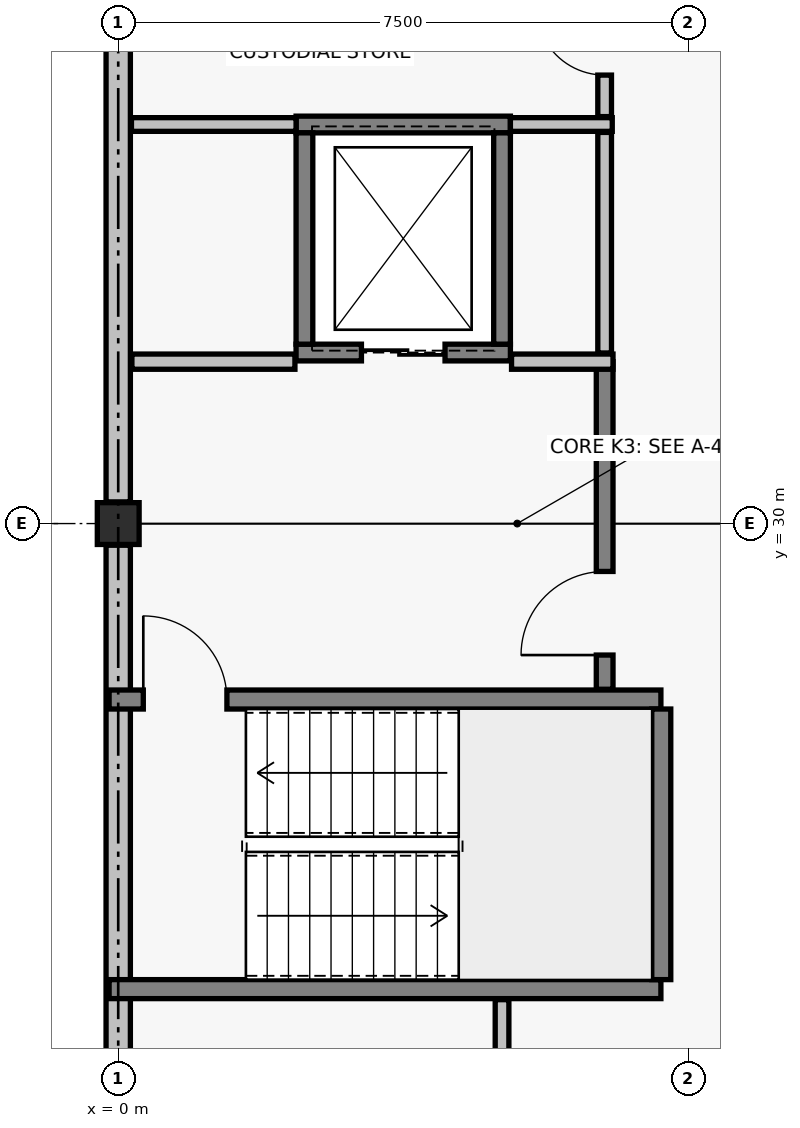
"""IFC4 building model, lengths in metres.
Left out: names, types, materials, properties, quantities, classifications, styles, units other than length and angle.
Written with IfcOpenShell. Run it as: python <this file> out.ifc"""

import sys

from ifc_helpers import new_model, si_unit, direction, frame, frame_2d, origin, origin_2d, place, context, subcontext, project, spatial, rectangle, extrude, element, fill, save


model = new_model("IFC4")
c1 = context("Model", 3, precision=1e-05, world=origin(), true_north=direction((0.0, 1.0)))
c2 = subcontext(c1, "Body", "Model", "MODEL_VIEW")
j1 = project(units=[si_unit("LENGTHUNIT", "METRE"), si_unit("PLANEANGLEUNIT", "RADIAN")], contexts=[c1])
p1 = place(None, origin())
s1 = spatial("IfcSite", under=j1, at=p1, CompositionType="ELEMENT")
p2 = place(p1, origin())
s2 = spatial("IfcBuilding", under=s1, at=p2, CompositionType="ELEMENT")
p3 = place(p2, frame((0.0, 0.0, 13.2)))
s3 = spatial("IfcBuildingStorey", under=s2, at=p3, CompositionType="ELEMENT", Elevation=13.2)
p4 = place(p3, frame((0.0, 30.0, 0.0), z_axis=(0.0, 0.0, 1.0), x_axis=(1.0, 0.0, 0.0)))
e1 = element("IfcColumn", 1, at=p4, inside=s3, PredefinedType="COLUMN", context=c2, shape_type="SweptSolid", body=[
    extrude(rectangle(XDim=0.55, YDim=0.55, at=origin_2d()), origin(), (0.0, 0.0, 1.0), 3.9),
])
for number, where, z_axis, x_axis in (
    (2, (0.0, 22.785, 0.0), (0.0, 0.0, 1.0), (0.0, 1.0, 0.0)),
    (3, (0.0, 30.285, 0.0), (0.0, 0.0, 1.0), (0.0, 1.0, 0.0)),
):
    element("IfcWall", number, at=place(p3, frame(where, z_axis=z_axis, x_axis=x_axis)), inside=s3, PredefinedType="SOLIDWALL", context=c2, shape_type="SweptSolid", body=[
        extrude(rectangle(XDim=6.93, YDim=0.32, at=frame_2d((3.465, 0.0))), origin(), (0.0, 0.0, 1.0), 2.59),
    ])
p5 = place(p3, frame((-0.12, 23.875, 0.0), z_axis=(0.0, 0.0, 1.0), x_axis=(1.0, 0.0, 0.0)))
e4 = element("IfcWall", 4, at=p5, inside=s3, PredefinedType="SOLIDWALL", context=c2, shape_type="SweptSolid", body=[
    extrude(rectangle(XDim=7.26, YDim=0.25, at=frame_2d((3.63, 0.0))), origin(), (0.0, 0.0, 1.0), 3.62),
])
p6 = place(p3, frame((-0.12, 27.685, 0.0), z_axis=(0.0, 0.0, 1.0), x_axis=(1.0, 0.0, 0.0)))
e5 = element("IfcWall", 5, at=p6, inside=s3, PredefinedType="SOLIDWALL", context=c2, shape_type="SweptSolid", body=[
    extrude(rectangle(XDim=7.26, YDim=0.25, at=frame_2d((3.63, 0.0))), origin(), (0.0, 0.0, 1.0), 3.62),
])
p7 = place(p6, frame((0.45, 0.0, 0.0)))
e6 = element("IfcOpeningElement", 6, at=p7, cuts=e5, PredefinedType="OPENING", context=c2, shape_type="SweptSolid", body=[
    extrude(rectangle(XDim=1.1, YDim=2.15, at=frame_2d((0.55, 1.075))), frame((0.0, 0.135, 0.0), z_axis=(0.0, -1.0, 0.0), x_axis=(1.0, 0.0, 0.0)), (0.0, 0.0, 1.0), 0.27),
])
p8 = place(p3, frame((7.145, 24.0, 0.0), z_axis=(0.0, 0.0, 1.0), x_axis=(0.0, 1.0, 0.0)))
e7 = element("IfcWall", 7, at=p8, inside=s3, PredefinedType="SOLIDWALL", context=c2, shape_type="SweptSolid", body=[
    extrude(rectangle(XDim=3.56, YDim=0.25, at=frame_2d((1.78, 0.0))), origin(), (0.0, 0.0, 1.0), 3.62),
])
p9 = place(p3, frame((2.34, 32.25, 0.0), z_axis=(0.0, 0.0, 1.0), x_axis=(1.0, 0.0, 0.0)))
e8 = element("IfcWall", 8, at=p9, inside=s3, PredefinedType="SOLIDWALL", context=c2, shape_type="SweptSolid", body=[
    extrude(rectangle(XDim=2.82, YDim=0.22, at=frame_2d((1.41, 0.0))), origin(), (0.0, 0.0, 1.0), 3.62),
])
p10 = place(p9, frame((0.86, 0.0, 0.0)))
e9 = element("IfcOpeningElement", 9, at=p10, cuts=e8, PredefinedType="OPENING", context=c2, shape_type="SweptSolid", body=[
    extrude(rectangle(XDim=1.1, YDim=2.15, at=frame_2d((0.55, 1.075))), frame((0.0, 0.12, 0.0), z_axis=(0.0, -1.0, 0.0), x_axis=(1.0, 0.0, 0.0)), (0.0, 0.0, 1.0), 0.24),
])
p11 = place(p3, frame((2.34, 35.25, 0.0), z_axis=(0.0, 0.0, 1.0), x_axis=(1.0, 0.0, 0.0)))
e10 = element("IfcWall", 10, at=p11, inside=s3, PredefinedType="SOLIDWALL", context=c2, shape_type="SweptSolid", body=[
    extrude(rectangle(XDim=2.82, YDim=0.22, at=frame_2d((1.41, 0.0))), origin(), (0.0, 0.0, 1.0), 3.62),
])
for number, where, z_axis, x_axis in (
    (11, (2.45, 32.36, 0.0), (0.0, 0.0, 1.0), (0.0, 1.0, 0.0)),
    (12, (5.05, 32.36, 0.0), (0.0, 0.0, 1.0), (0.0, 1.0, 0.0)),
):
    element("IfcWall", number, at=place(p3, frame(where, z_axis=z_axis, x_axis=x_axis)), inside=s3, PredefinedType="SOLIDWALL", context=c2, shape_type="SweptSolid", body=[
        extrude(rectangle(XDim=2.78, YDim=0.22, at=frame_2d((1.39, 0.0))), origin(), (0.0, 0.0, 1.0), 3.62),
    ])
p12 = place(p3, frame((6.4, 27.82, 0.0), z_axis=(0.0, 0.0, 1.0), x_axis=(0.0, 1.0, 0.0)))
e13 = element("IfcWall", 13, at=p12, inside=s3, PredefinedType="SOLIDWALL", context=c2, shape_type="SweptSolid", body=[
    extrude(rectangle(XDim=4.31, YDim=0.22, at=frame_2d((2.155, 0.0))), origin(), (0.0, 0.0, 1.0), 3.62),
])
p13 = place(p12, frame((0.45, 0.0, 0.0)))
e14 = element("IfcOpeningElement", 14, at=p13, cuts=e13, PredefinedType="OPENING", context=c2, shape_type="SweptSolid", body=[
    extrude(rectangle(XDim=1.1, YDim=2.15, at=frame_2d((0.55, 1.075))), frame((0.0, 0.12, 0.0), z_axis=(0.0, -1.0, 0.0), x_axis=(1.0, 0.0, 0.0)), (0.0, 0.0, 1.0), 0.24),
])
p14 = place(p3, frame((0.18, 32.13, 0.0), z_axis=(0.0, 0.0, 1.0), x_axis=(1.0, 0.0, 0.0)))
e15 = element("IfcWall", 15, at=p14, inside=s3, PredefinedType="PARTITIONING", context=c2, shape_type="SweptSolid", body=[
    extrude(rectangle(XDim=2.145, YDim=0.2, at=frame_2d((1.073, 0.0))), origin(), (0.0, 0.0, 1.0), 2.85),
])
p15 = place(p3, frame((5.175, 32.13, 0.0), z_axis=(0.0, 0.0, 1.0), x_axis=(1.0, 0.0, 0.0)))
e16 = element("IfcWall", 16, at=p15, inside=s3, PredefinedType="PARTITIONING", context=c2, shape_type="SweptSolid", body=[
    extrude(rectangle(XDim=1.335, YDim=0.2, at=frame_2d((0.667, 0.0))), origin(), (0.0, 0.0, 1.0), 3.05),
])
p16 = place(p3, frame((5.05, 20.274, 0.0), z_axis=(0.0, 0.0, 1.0), x_axis=(0.0, 1.0, 0.0)))
e17 = element("IfcWall", 17, at=p16, inside=s3, PredefinedType="PARTITIONING", context=c2, shape_type="SweptSolid", body=[
    extrude(rectangle(XDim=3.462, YDim=0.18, at=frame_2d((1.731, 0.0))), origin(), (0.0, 0.0, 1.0), 2.59),
])
p17 = place(p3, frame((0.174, 35.25, 0.0), z_axis=(0.0, 0.0, 1.0), x_axis=(1.0, 0.0, 0.0)))
e18 = element("IfcWall", 18, at=p17, inside=s3, PredefinedType="PARTITIONING", context=c2, shape_type="SweptSolid", body=[
    extrude(rectangle(XDim=2.166, YDim=0.18, at=frame_2d((1.083, 0.0))), origin(), (0.0, 0.0, 1.0), 2.84),
])
p18 = place(p3, frame((5.16, 35.25, 0.0), z_axis=(0.0, 0.0, 1.0), x_axis=(1.0, 0.0, 0.0)))
e19 = element("IfcWall", 19, at=p18, inside=s3, PredefinedType="PARTITIONING", context=c2, shape_type="SweptSolid", body=[
    extrude(rectangle(XDim=1.34, YDim=0.18, at=frame_2d((0.67, 0.0))), origin(), (0.0, 0.0, 1.0), 2.97),
])
p19 = place(p3, frame((6.4, 32.244, 0.0), z_axis=(0.0, 0.0, 1.0), x_axis=(0.0, 1.0, 0.0)))
e20 = element("IfcWall", 20, at=p19, inside=s3, PredefinedType="PARTITIONING", context=c2, shape_type="SweptSolid", body=[
    extrude(rectangle(XDim=2.902, YDim=0.18, at=frame_2d((1.451, 0.0))), origin(), (0.0, 0.0, 1.0), 2.97),
])
p20 = place(p3, frame((6.4, 35.354, 0.0), z_axis=(0.0, 0.0, 1.0), x_axis=(0.0, 1.0, 0.0)))
e21 = element("IfcWall", 21, at=p20, inside=s3, PredefinedType="PARTITIONING", context=c2, shape_type="SweptSolid", body=[
    extrude(rectangle(XDim=2.052, YDim=0.18, at=frame_2d((1.026, 0.0))), origin(), (0.0, 0.0, 1.0), 2.59),
])
p21 = place(p20, frame((0.546, 0.0, 0.0)))
e22 = element("IfcOpeningElement", 22, at=p21, cuts=e21, PredefinedType="OPENING", context=c2, shape_type="SweptSolid", body=[
    extrude(rectangle(XDim=0.9, YDim=2.1, at=frame_2d((0.45, 1.05))), frame((0.0, 0.1, 0.0), z_axis=(0.0, -1.0, 0.0), x_axis=(1.0, 0.0, 0.0)), (0.0, 0.0, 1.0), 0.2),
])
p22 = place(p7, origin())
e23 = element("IfcDoor", 23, at=p22, inside=s3, OperationType="SINGLE_SWING_LEFT", PredefinedType="DOOR", context=c2, shape_type="SweptSolid", body=[
    extrude(rectangle(XDim=1.1, YDim=2.15, at=frame_2d((0.55, 1.075))), frame((0.0, 0.025, 0.0), z_axis=(0.0, -1.0, 0.0), x_axis=(1.0, 0.0, 0.0)), (0.0, 0.0, 1.0), 0.05),
])
fill(e6, e23)
p23 = place(p10, origin())
e24 = element("IfcDoor", 24, at=p23, inside=s3, OperationType="SLIDING_TO_LEFT", PredefinedType="DOOR", context=c2, shape_type="SweptSolid", body=[
    extrude(rectangle(XDim=1.1, YDim=2.15, at=frame_2d((0.55, 1.075))), frame((0.0, 0.025, 0.0), z_axis=(0.0, -1.0, 0.0), x_axis=(1.0, 0.0, 0.0)), (0.0, 0.0, 1.0), 0.05),
])
fill(e9, e24)
p24 = place(p13, origin())
e25 = element("IfcDoor", 25, at=p24, inside=s3, OperationType="SINGLE_SWING_LEFT", PredefinedType="DOOR", context=c2, shape_type="SweptSolid", body=[
    extrude(rectangle(XDim=1.1, YDim=2.15, at=frame_2d((0.55, 1.075))), frame((0.0, 0.025, 0.0), z_axis=(0.0, -1.0, 0.0), x_axis=(1.0, 0.0, 0.0)), (0.0, 0.0, 1.0), 0.05),
])
fill(e14, e25)
p25 = place(p21, origin())
e26 = element("IfcDoor", 26, at=p25, inside=s3, OperationType="SINGLE_SWING_RIGHT", PredefinedType="DOOR", context=c2, shape_type="SweptSolid", body=[
    extrude(rectangle(XDim=0.9, YDim=2.1, at=frame_2d((0.45, 1.05))), frame((0.0, 0.025, 0.0), z_axis=(0.0, -1.0, 0.0), x_axis=(1.0, 0.0, 0.0)), (0.0, 0.0, 1.0), 0.05),
])
fill(e22, e26)
save(model, sys.argv[1])
